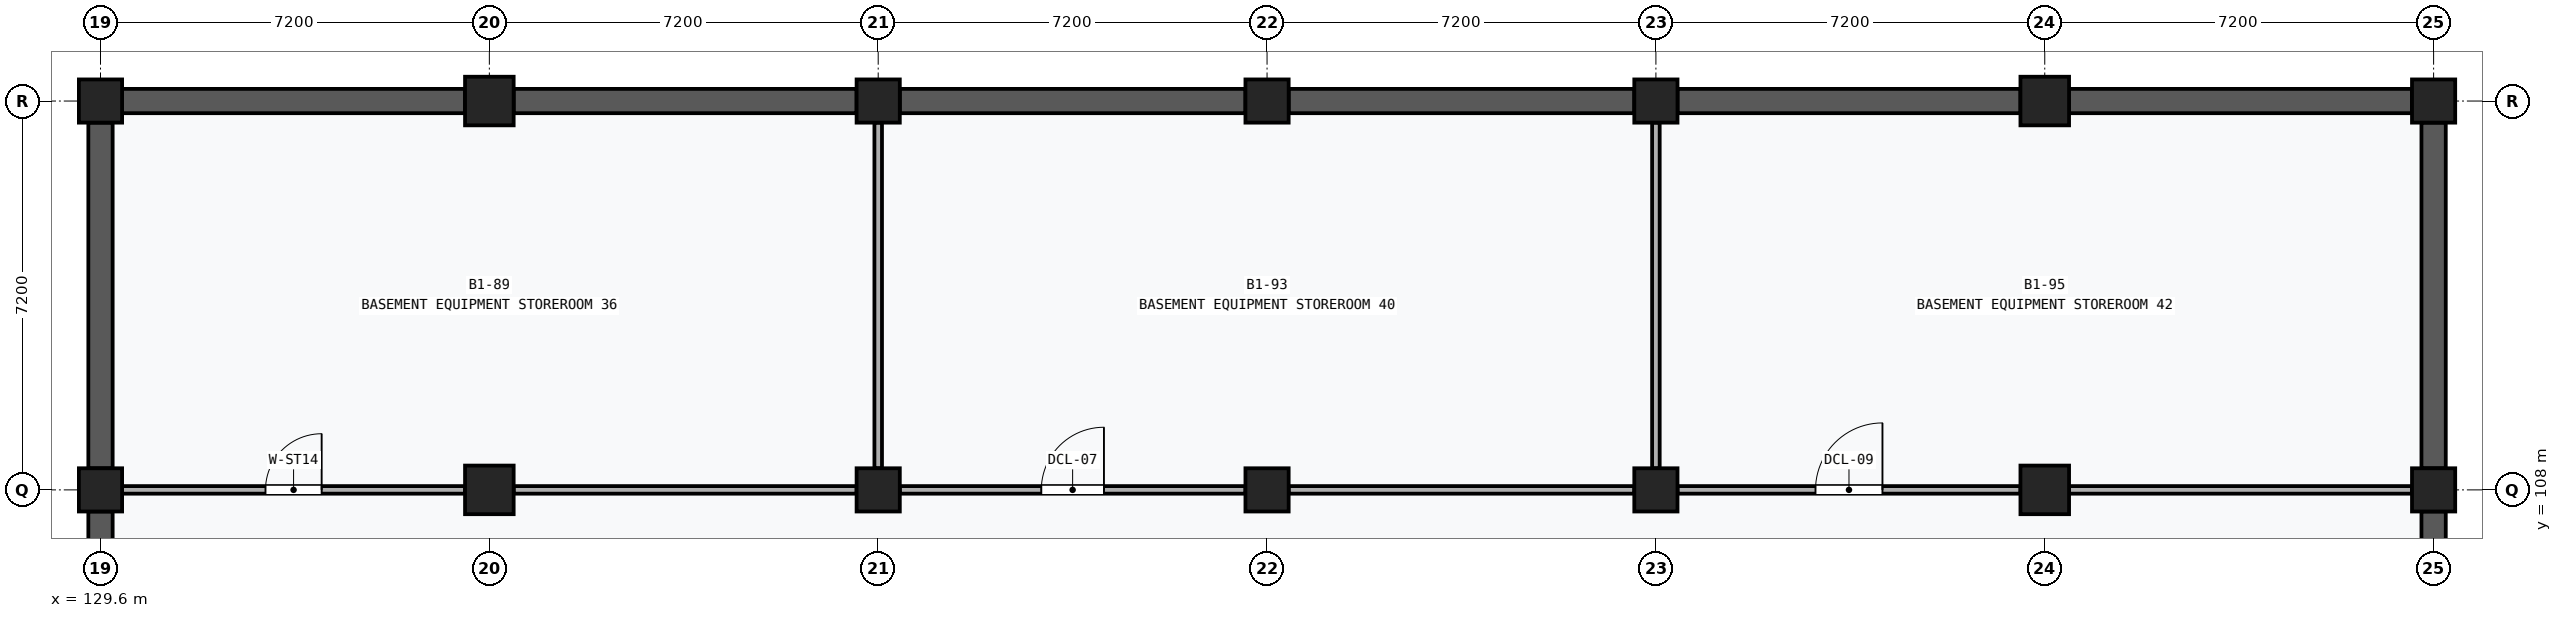
"""IFC4 building model, lengths in metres.
Left out: names, types, materials, properties, quantities, classifications, styles, units other than length and angle.
Written with IfcOpenShell. Run it as: python <this file> out.ifc"""

import sys

from ifc_helpers import new_model, si_unit, direction, frame, frame_2d, origin, origin_2d, place, context, subcontext, project, spatial, rectangle, extrude, element, fill, save


model = new_model("IFC4")
c1 = context("Model", 3, precision=1e-05, world=origin(), true_north=direction((0.0, 1.0)))
c2 = subcontext(c1, "Body", "Model", "MODEL_VIEW")
j1 = project(units=[si_unit("LENGTHUNIT", "METRE"), si_unit("PLANEANGLEUNIT", "RADIAN")], contexts=[c1])
p1 = place(None, origin())
s1 = spatial("IfcSite", under=j1, at=p1, CompositionType="ELEMENT")
p2 = place(p1, origin())
s2 = spatial("IfcBuilding", under=s1, at=p2, CompositionType="ELEMENT")
p3 = place(p2, frame((0.0, 0.0, -4.5)))
s3 = spatial("IfcBuildingStorey", under=s2, at=p3, CompositionType="ELEMENT", Elevation=-4.5)
for number, where, z_axis, x_axis in (
    (1, (129.6, 108.0, 0.0), (0.0, 0.0, 1.0), (1.0, 0.0, 0.0)),
    (2, (129.6, 115.2, 0.0), (0.0, 0.0, 1.0), (1.0, 0.0, 0.0)),
):
    element("IfcColumn", number, at=place(p3, frame(where, z_axis=z_axis, x_axis=x_axis)), inside=s3, PredefinedType="COLUMN", context=c2, shape_type="SweptSolid", body=[
        extrude(rectangle(XDim=0.8, YDim=0.8, at=origin_2d()), origin(), (0.0, 0.0, 1.0), 4.5),
    ])
for number, where, z_axis, x_axis in (
    (3, (136.8, 108.0, 0.0), (0.0, 0.0, 1.0), (1.0, 0.0, 0.0)),
    (4, (136.8, 115.2, 0.0), (0.0, 0.0, 1.0), (1.0, 0.0, 0.0)),
):
    element("IfcColumn", number, at=place(p3, frame(where, z_axis=z_axis, x_axis=x_axis)), inside=s3, PredefinedType="COLUMN", context=c2, shape_type="SweptSolid", body=[
        extrude(rectangle(XDim=0.9, YDim=0.9, at=origin_2d()), origin(), (0.0, 0.0, 1.0), 4.5),
    ])
for number, where, z_axis, x_axis in (
    (5, (144.0, 108.0, 0.0), (0.0, 0.0, 1.0), (1.0, 0.0, 0.0)),
    (6, (144.0, 115.2, 0.0), (0.0, 0.0, 1.0), (1.0, 0.0, 0.0)),
    (7, (151.2, 108.0, 0.0), (0.0, 0.0, 1.0), (1.0, 0.0, 0.0)),
    (8, (151.2, 115.2, 0.0), (0.0, 0.0, 1.0), (1.0, 0.0, 0.0)),
    (9, (158.4, 108.0, 0.0), (0.0, 0.0, 1.0), (1.0, 0.0, 0.0)),
    (10, (158.4, 115.2, 0.0), (0.0, 0.0, 1.0), (1.0, 0.0, 0.0)),
):
    element("IfcColumn", number, at=place(p3, frame(where, z_axis=z_axis, x_axis=x_axis)), inside=s3, PredefinedType="COLUMN", context=c2, shape_type="SweptSolid", body=[
        extrude(rectangle(XDim=0.8, YDim=0.8, at=origin_2d()), origin(), (0.0, 0.0, 1.0), 4.5),
    ])
for number, where, z_axis, x_axis in (
    (11, (165.6, 108.0, 0.0), (0.0, 0.0, 1.0), (1.0, 0.0, 0.0)),
    (12, (165.6, 115.2, 0.0), (0.0, 0.0, 1.0), (1.0, 0.0, 0.0)),
):
    element("IfcColumn", number, at=place(p3, frame(where, z_axis=z_axis, x_axis=x_axis)), inside=s3, PredefinedType="COLUMN", context=c2, shape_type="SweptSolid", body=[
        extrude(rectangle(XDim=0.9, YDim=0.9, at=origin_2d()), origin(), (0.0, 0.0, 1.0), 4.5),
    ])
for number, where, z_axis, x_axis in (
    (13, (172.8, 108.0, 0.0), (0.0, 0.0, 1.0), (1.0, 0.0, 0.0)),
    (14, (172.8, 115.2, 0.0), (0.0, 0.0, 1.0), (1.0, 0.0, 0.0)),
):
    element("IfcColumn", number, at=place(p3, frame(where, z_axis=z_axis, x_axis=x_axis)), inside=s3, PredefinedType="COLUMN", context=c2, shape_type="SweptSolid", body=[
        extrude(rectangle(XDim=0.8, YDim=0.8, at=origin_2d()), origin(), (0.0, 0.0, 1.0), 4.5),
    ])
p4 = place(p3, frame((129.6, 101.2, 0.0), z_axis=(0.0, 0.0, 1.0), x_axis=(0.0, 1.0, 0.0)))
e15 = element("IfcWall", 15, at=p4, inside=s3, PredefinedType="SOLIDWALL", context=c2, shape_type="SweptSolid", body=[
    extrude(rectangle(XDim=6.4, YDim=0.45, at=frame_2d((3.2, 0.0))), origin(), (0.0, 0.0, 1.0), 3.57),
])
p5 = place(p3, frame((130.0, 115.2, 0.0), z_axis=(0.0, 0.0, 1.0), x_axis=(1.0, 0.0, 0.0)))
e16 = element("IfcWall", 16, at=p5, inside=s3, PredefinedType="SOLIDWALL", context=c2, shape_type="SweptSolid", body=[
    extrude(rectangle(XDim=6.35, YDim=0.45, at=frame_2d((3.175, 0.0))), origin(), (0.0, 0.0, 1.0), 3.57),
])
p6 = place(p3, frame((129.6, 108.4, 0.0), z_axis=(0.0, 0.0, 1.0), x_axis=(0.0, 1.0, 0.0)))
e17 = element("IfcWall", 17, at=p6, inside=s3, PredefinedType="SOLIDWALL", context=c2, shape_type="SweptSolid", body=[
    extrude(rectangle(XDim=6.4, YDim=0.45, at=frame_2d((3.2, 0.0))), origin(), (0.0, 0.0, 1.0), 3.57),
])
p7 = place(p3, frame((137.25, 115.2, 0.0), z_axis=(0.0, 0.0, 1.0), x_axis=(1.0, 0.0, 0.0)))
e18 = element("IfcWall", 18, at=p7, inside=s3, PredefinedType="SOLIDWALL", context=c2, shape_type="SweptSolid", body=[
    extrude(rectangle(XDim=6.35, YDim=0.45, at=frame_2d((3.175, 0.0))), origin(), (0.0, 0.0, 1.0), 3.57),
])
p8 = place(p3, frame((144.4, 115.2, 0.0), z_axis=(0.0, 0.0, 1.0), x_axis=(1.0, 0.0, 0.0)))
e19 = element("IfcWall", 19, at=p8, inside=s3, PredefinedType="SOLIDWALL", context=c2, shape_type="SweptSolid", body=[
    extrude(rectangle(XDim=6.4, YDim=0.45, at=frame_2d((3.2, 0.0))), origin(), (0.0, 0.0, 1.0), 3.57),
])
p9 = place(p3, frame((151.6, 115.2, 0.0), z_axis=(0.0, 0.0, 1.0), x_axis=(1.0, 0.0, 0.0)))
e20 = element("IfcWall", 20, at=p9, inside=s3, PredefinedType="SOLIDWALL", context=c2, shape_type="SweptSolid", body=[
    extrude(rectangle(XDim=6.4, YDim=0.45, at=frame_2d((3.2, 0.0))), origin(), (0.0, 0.0, 1.0), 3.57),
])
p10 = place(p3, frame((158.8, 115.2, 0.0), z_axis=(0.0, 0.0, 1.0), x_axis=(1.0, 0.0, 0.0)))
e21 = element("IfcWall", 21, at=p10, inside=s3, PredefinedType="SOLIDWALL", context=c2, shape_type="SweptSolid", body=[
    extrude(rectangle(XDim=6.35, YDim=0.45, at=frame_2d((3.175, 0.0))), origin(), (0.0, 0.0, 1.0), 3.57),
])
p11 = place(p3, frame((172.8, 101.2, 0.0), z_axis=(0.0, 0.0, 1.0), x_axis=(0.0, 1.0, 0.0)))
e22 = element("IfcWall", 22, at=p11, inside=s3, PredefinedType="SOLIDWALL", context=c2, shape_type="SweptSolid", body=[
    extrude(rectangle(XDim=6.4, YDim=0.45, at=frame_2d((3.2, 0.0))), origin(), (0.0, 0.0, 1.0), 3.57),
])
p12 = place(p3, frame((166.05, 115.2, 0.0), z_axis=(0.0, 0.0, 1.0), x_axis=(1.0, 0.0, 0.0)))
e23 = element("IfcWall", 23, at=p12, inside=s3, PredefinedType="SOLIDWALL", context=c2, shape_type="SweptSolid", body=[
    extrude(rectangle(XDim=6.35, YDim=0.45, at=frame_2d((3.175, 0.0))), origin(), (0.0, 0.0, 1.0), 3.57),
])
p13 = place(p3, frame((172.8, 108.4, 0.0), z_axis=(0.0, 0.0, 1.0), x_axis=(0.0, 1.0, 0.0)))
e24 = element("IfcWall", 24, at=p13, inside=s3, PredefinedType="SOLIDWALL", context=c2, shape_type="SweptSolid", body=[
    extrude(rectangle(XDim=6.4, YDim=0.45, at=frame_2d((3.2, 0.0))), origin(), (0.0, 0.0, 1.0), 3.57),
])
p14 = place(p3, frame((130.0, 108.0, 0.0), z_axis=(0.0, 0.0, 1.0), x_axis=(1.0, 0.0, 0.0)))
e25 = element("IfcWall", 25, at=p14, inside=s3, PredefinedType="PARTITIONING", context=c2, shape_type="SweptSolid", body=[
    extrude(rectangle(XDim=6.35, YDim=0.14, at=frame_2d((3.175, 0.0))), origin(), (0.0, 0.0, 1.0), 3.3),
])
p15 = place(p14, frame((2.655, 0.0, 0.0)))
e26 = element("IfcOpeningElement", 26, at=p15, cuts=e25, PredefinedType="OPENING", context=c2, shape_type="SweptSolid", body=[
    extrude(rectangle(XDim=1.04, YDim=2.14, at=frame_2d((0.52, 1.07))), frame((0.0, 0.082, 0.0), z_axis=(0.0, -1.0, 0.0), x_axis=(1.0, 0.0, 0.0)), (0.0, 0.0, 1.0), 0.164),
])
p16 = place(p3, frame((137.25, 108.0, 0.0), z_axis=(0.0, 0.0, 1.0), x_axis=(1.0, 0.0, 0.0)))
e27 = element("IfcWall", 27, at=p16, inside=s3, PredefinedType="PARTITIONING", context=c2, shape_type="SweptSolid", body=[
    extrude(rectangle(XDim=6.35, YDim=0.14, at=frame_2d((3.175, 0.0))), origin(), (0.0, 0.0, 1.0), 3.3),
])
p17 = place(p3, frame((144.0, 108.4, 0.0), z_axis=(0.0, 0.0, 1.0), x_axis=(0.0, 1.0, 0.0)))
e28 = element("IfcWall", 28, at=p17, inside=s3, PredefinedType="PARTITIONING", context=c2, shape_type="SweptSolid", body=[
    extrude(rectangle(XDim=6.4, YDim=0.14, at=frame_2d((3.2, 0.0))), origin(), (0.0, 0.0, 1.0), 3.3),
])
p18 = place(p3, frame((144.4, 108.0, 0.0), z_axis=(0.0, 0.0, 1.0), x_axis=(1.0, 0.0, 0.0)))
e29 = element("IfcWall", 29, at=p18, inside=s3, PredefinedType="PARTITIONING", context=c2, shape_type="SweptSolid", body=[
    extrude(rectangle(XDim=6.4, YDim=0.14, at=frame_2d((3.2, 0.0))), origin(), (0.0, 0.0, 1.0), 3.3),
])
p19 = place(p18, frame((2.62, 0.0, 0.0)))
e30 = element("IfcOpeningElement", 30, at=p19, cuts=e29, PredefinedType="OPENING", context=c2, shape_type="SweptSolid", body=[
    extrude(rectangle(XDim=1.16, YDim=2.22, at=frame_2d((0.58, 1.11))), frame((0.0, 0.082, 0.0), z_axis=(0.0, -1.0, 0.0), x_axis=(1.0, 0.0, 0.0)), (0.0, 0.0, 1.0), 0.164),
])
p20 = place(p3, frame((151.6, 108.0, 0.0), z_axis=(0.0, 0.0, 1.0), x_axis=(1.0, 0.0, 0.0)))
e31 = element("IfcWall", 31, at=p20, inside=s3, PredefinedType="PARTITIONING", context=c2, shape_type="SweptSolid", body=[
    extrude(rectangle(XDim=6.4, YDim=0.14, at=frame_2d((3.2, 0.0))), origin(), (0.0, 0.0, 1.0), 3.3),
])
p21 = place(p3, frame((158.4, 108.4, 0.0), z_axis=(0.0, 0.0, 1.0), x_axis=(0.0, 1.0, 0.0)))
e32 = element("IfcWall", 32, at=p21, inside=s3, PredefinedType="PARTITIONING", context=c2, shape_type="SweptSolid", body=[
    extrude(rectangle(XDim=6.4, YDim=0.14, at=frame_2d((3.2, 0.0))), origin(), (0.0, 0.0, 1.0), 3.3),
])
p22 = place(p3, frame((158.8, 108.0, 0.0), z_axis=(0.0, 0.0, 1.0), x_axis=(1.0, 0.0, 0.0)))
e33 = element("IfcWall", 33, at=p22, inside=s3, PredefinedType="PARTITIONING", context=c2, shape_type="SweptSolid", body=[
    extrude(rectangle(XDim=6.35, YDim=0.14, at=frame_2d((3.175, 0.0))), origin(), (0.0, 0.0, 1.0), 3.3),
])
p23 = place(p22, frame((2.555, 0.0, 0.0)))
e34 = element("IfcOpeningElement", 34, at=p23, cuts=e33, PredefinedType="OPENING", context=c2, shape_type="SweptSolid", body=[
    extrude(rectangle(XDim=1.24, YDim=2.26, at=frame_2d((0.62, 1.13))), frame((0.0, 0.082, 0.0), z_axis=(0.0, -1.0, 0.0), x_axis=(1.0, 0.0, 0.0)), (0.0, 0.0, 1.0), 0.164),
])
p24 = place(p3, frame((166.05, 108.0, 0.0), z_axis=(0.0, 0.0, 1.0), x_axis=(1.0, 0.0, 0.0)))
e35 = element("IfcWall", 35, at=p24, inside=s3, PredefinedType="PARTITIONING", context=c2, shape_type="SweptSolid", body=[
    extrude(rectangle(XDim=6.35, YDim=0.14, at=frame_2d((3.175, 0.0))), origin(), (0.0, 0.0, 1.0), 3.3),
])
p25 = place(p15, origin())
e36 = element("IfcDoor", 36, at=p25, inside=s3, OperationType="SINGLE_SWING_RIGHT", PredefinedType="DOOR", context=c2, shape_type="SweptSolid", body=[
    extrude(rectangle(XDim=1.04, YDim=2.14, at=frame_2d((0.52, 1.07))), frame((0.0, 0.025, 0.0), z_axis=(0.0, -1.0, 0.0), x_axis=(1.0, 0.0, 0.0)), (0.0, 0.0, 1.0), 0.05),
])
fill(e26, e36)
p26 = place(p19, origin())
e37 = element("IfcDoor", 37, at=p26, inside=s3, OperationType="SINGLE_SWING_RIGHT", PredefinedType="DOOR", context=c2, shape_type="SweptSolid", body=[
    extrude(rectangle(XDim=1.16, YDim=2.22, at=frame_2d((0.58, 1.11))), frame((0.0, 0.025, 0.0), z_axis=(0.0, -1.0, 0.0), x_axis=(1.0, 0.0, 0.0)), (0.0, 0.0, 1.0), 0.05),
])
fill(e30, e37)
p27 = place(p23, origin())
e38 = element("IfcDoor", 38, at=p27, inside=s3, OperationType="SINGLE_SWING_RIGHT", PredefinedType="DOOR", context=c2, shape_type="SweptSolid", body=[
    extrude(rectangle(XDim=1.24, YDim=2.26, at=frame_2d((0.62, 1.13))), frame((0.0, 0.025, 0.0), z_axis=(0.0, -1.0, 0.0), x_axis=(1.0, 0.0, 0.0)), (0.0, 0.0, 1.0), 0.05),
])
fill(e34, e38)
save(model, sys.argv[1])
